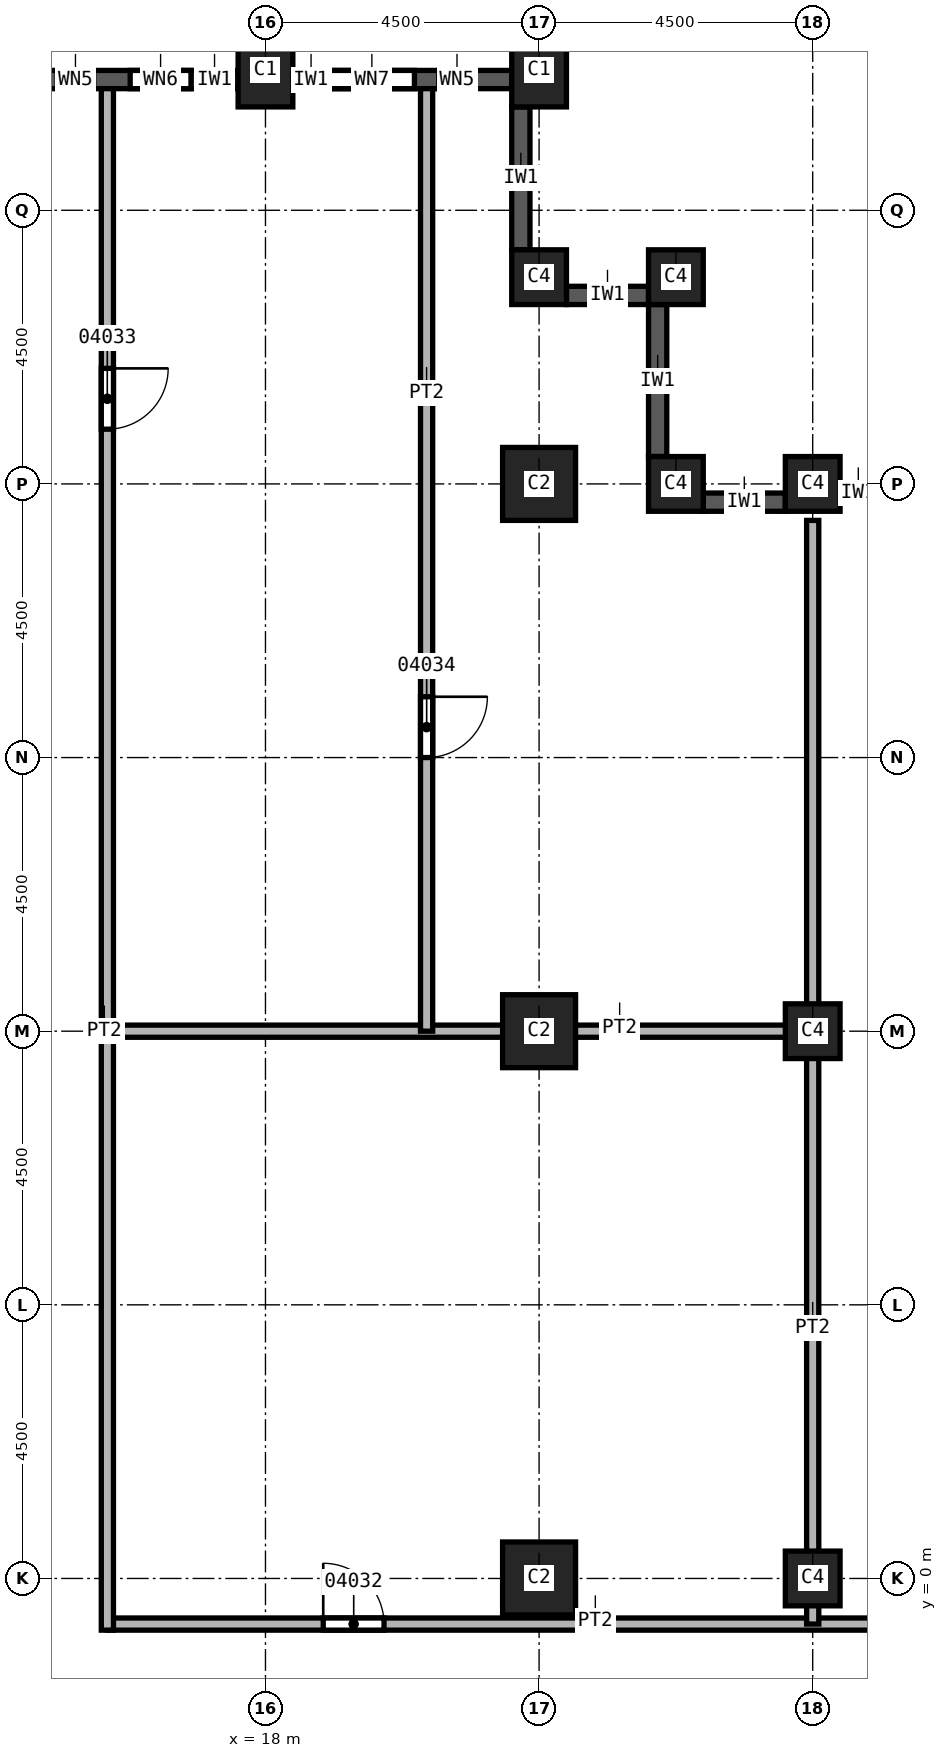
"""IFC4 building model, lengths in metres.
Left out: names, types, materials, properties, quantities, classifications, styles, units other than length and angle.
Written with IfcOpenShell. Run it as: python <this file> out.ifc"""

import sys

from ifc_helpers import new_model, si_unit, direction, frame, frame_2d, origin, origin_2d, place, context, subcontext, project, spatial, rectangle, extrude, element, fill, save


model = new_model("IFC4")
c1 = context("Model", 3, precision=1e-05, world=origin(), true_north=direction((0.0, 1.0)))
c2 = subcontext(c1, "Body", "Model", "MODEL_VIEW")
j1 = project(units=[si_unit("LENGTHUNIT", "METRE"), si_unit("PLANEANGLEUNIT", "RADIAN")], contexts=[c1])
p1 = place(None, origin())
s1 = spatial("IfcSite", under=j1, at=p1, CompositionType="ELEMENT")
p2 = place(p1, origin())
s2 = spatial("IfcBuilding", under=s1, at=p2, CompositionType="ELEMENT")
p3 = place(p2, frame((0.0, 0.0, 108.0)))
s3 = spatial("IfcBuildingStorey", under=s2, at=p3, CompositionType="ELEMENT", Elevation=108.0)
for number, where, z_axis, x_axis in (
    (1, (22.5, 0.0, 0.0), (0.0, 0.0, 1.0), (1.0, 0.0, 0.0)),
    (2, (22.5, 9.0, 0.0), (0.0, 0.0, 1.0), (1.0, 0.0, 0.0)),
    (3, (22.5, 18.0, 0.0), (0.0, 0.0, 1.0), (1.0, 0.0, 0.0)),
):
    element("IfcColumn", number, at=place(p3, frame(where, z_axis=z_axis, x_axis=x_axis)), inside=s3, PredefinedType="COLUMN", context=c2, shape_type="SweptSolid", body=[
        extrude(rectangle(XDim=1.2, YDim=1.2, at=origin_2d()), origin(), (0.0, 0.0, 1.0), 3.7),
    ])
for number, where, z_axis, x_axis in (
    (4, (27.0, 0.0, 0.0), (0.0, 0.0, 1.0), (1.0, 0.0, 0.0)),
    (5, (27.0, 9.0, 0.0), (0.0, 0.0, 1.0), (1.0, 0.0, 0.0)),
    (6, (27.0, 18.0, 0.0), (0.0, 0.0, 1.0), (1.0, 0.0, 0.0)),
):
    element("IfcColumn", number, at=place(p3, frame(where, z_axis=z_axis, x_axis=x_axis)), inside=s3, PredefinedType="COLUMN", context=c2, shape_type="SweptSolid", body=[
        extrude(rectangle(XDim=0.9, YDim=0.9, at=origin_2d()), origin(), (0.0, 0.0, 1.0), 3.7),
    ])
for number, where, z_axis, x_axis in (
    (7, (18.0, 24.8, 0.0), (0.0, 0.0, 1.0), (1.0, 0.0, 0.0)),
    (8, (22.5, 24.8, 0.0), (0.0, 0.0, 1.0), (1.0, 0.0, 0.0)),
):
    element("IfcColumn", number, at=place(p3, frame(where, z_axis=z_axis, x_axis=x_axis)), inside=s3, PredefinedType="COLUMN", context=c2, shape_type="SweptSolid", body=[
        extrude(rectangle(XDim=0.9, YDim=1.2, at=origin_2d()), origin(), (0.0, 0.0, 1.0), 3.7),
    ])
for number, where, z_axis, x_axis in (
    (9, (22.5, 21.4, 0.0), (0.0, 0.0, 1.0), (1.0, 0.0, 0.0)),
    (10, (24.75, 21.4, 0.0), (0.0, 0.0, 1.0), (1.0, 0.0, 0.0)),
    (11, (24.75, 18.0, 0.0), (0.0, 0.0, 1.0), (1.0, 0.0, 0.0)),
):
    element("IfcColumn", number, at=place(p3, frame(where, z_axis=z_axis, x_axis=x_axis)), inside=s3, PredefinedType="COLUMN", context=c2, shape_type="SweptSolid", body=[
        extrude(rectangle(XDim=0.9, YDim=0.9, at=origin_2d()), origin(), (0.0, 0.0, 1.0), 3.7),
    ])
p4 = place(p3, frame((31.05, 17.85, 0.0), z_axis=(0.0, 0.0, 1.0), x_axis=(-1.0, 0.0, 0.0)))
e12 = element("IfcWall", 12, at=p4, inside=s3, PredefinedType="SOLIDWALL", context=c2, shape_type="SweptSolid", body=[
    extrude(rectangle(XDim=3.6, YDim=0.3, at=frame_2d((1.8, 0.0))), origin(), (0.0, 0.0, 1.0), 3.1),
])
p5 = place(p4, frame((0.6, 0.0, 0.8)))
e13 = element("IfcOpeningElement", 13, at=p5, cuts=e12, PredefinedType="OPENING", context=c2, shape_type="SweptSolid", body=[
    extrude(rectangle(XDim=1.0, YDim=1.95, at=frame_2d((0.5, 0.975))), frame((0.0, 0.15, 0.0), z_axis=(0.0, -1.0, 0.0), x_axis=(1.0, 0.0, 0.0)), (0.0, 0.0, 1.0), 0.3),
])
p6 = place(p4, frame((2.0, 0.0, 0.8)))
e14 = element("IfcOpeningElement", 14, at=p6, cuts=e12, PredefinedType="OPENING", context=c2, shape_type="SweptSolid", body=[
    extrude(rectangle(XDim=1.0, YDim=1.95, at=frame_2d((0.5, 0.975))), frame((0.0, 0.15, 0.0), z_axis=(0.0, -1.0, 0.0), x_axis=(1.0, 0.0, 0.0)), (0.0, 0.0, 1.0), 0.3),
])
p7 = place(p3, frame((26.55, 17.7, 0.0), z_axis=(0.0, 0.0, 1.0), x_axis=(-1.0, 0.0, 0.0)))
e15 = element("IfcWall", 15, at=p7, inside=s3, PredefinedType="SOLIDWALL", context=c2, shape_type="SweptSolid", body=[
    extrude(rectangle(XDim=1.35, YDim=0.3, at=frame_2d((0.675, 0.0))), origin(), (0.0, 0.0, 1.0), 3.1),
])
p8 = place(p3, frame((24.45, 18.45, 0.0), z_axis=(0.0, 0.0, 1.0), x_axis=(0.0, 1.0, 0.0)))
e16 = element("IfcWall", 16, at=p8, inside=s3, PredefinedType="SOLIDWALL", context=c2, shape_type="SweptSolid", body=[
    extrude(rectangle(XDim=2.5, YDim=0.3, at=frame_2d((1.25, 0.0))), origin(), (0.0, 0.0, 1.0), 3.1),
])
p9 = place(p3, frame((24.3, 21.1, 0.0), z_axis=(0.0, 0.0, 1.0), x_axis=(-1.0, 0.0, 0.0)))
e17 = element("IfcWall", 17, at=p9, inside=s3, PredefinedType="SOLIDWALL", context=c2, shape_type="SweptSolid", body=[
    extrude(rectangle(XDim=1.35, YDim=0.3, at=frame_2d((0.675, 0.0))), origin(), (0.0, 0.0, 1.0), 3.1),
])
p10 = place(p3, frame((22.2, 21.85, 0.0), z_axis=(0.0, 0.0, 1.0), x_axis=(0.0, 1.0, 0.0)))
e18 = element("IfcWall", 18, at=p10, inside=s3, PredefinedType="SOLIDWALL", context=c2, shape_type="SweptSolid", body=[
    extrude(rectangle(XDim=2.35, YDim=0.3, at=frame_2d((1.175, 0.0))), origin(), (0.0, 0.0, 1.0), 3.1),
])
p11 = place(p3, frame((22.05, 24.65, 0.0), z_axis=(0.0, 0.0, 1.0), x_axis=(-1.0, 0.0, 0.0)))
e19 = element("IfcWall", 19, at=p11, inside=s3, PredefinedType="SOLIDWALL", context=c2, shape_type="SweptSolid", body=[
    extrude(rectangle(XDim=3.6, YDim=0.3, at=frame_2d((1.8, 0.0))), origin(), (0.0, 0.0, 1.0), 3.1),
])
p12 = place(p11, frame((0.6, 0.0, 0.8)))
e20 = element("IfcOpeningElement", 20, at=p12, cuts=e19, PredefinedType="OPENING", context=c2, shape_type="SweptSolid", body=[
    extrude(rectangle(XDim=0.6, YDim=1.95, at=frame_2d((0.3, 0.975))), frame((0.0, 0.15, 0.0), z_axis=(0.0, -1.0, 0.0), x_axis=(1.0, 0.0, 0.0)), (0.0, 0.0, 1.0), 0.3),
])
p13 = place(p11, frame((1.6, 0.0, 0.8)))
e21 = element("IfcOpeningElement", 21, at=p13, cuts=e19, PredefinedType="OPENING", context=c2, shape_type="SweptSolid", body=[
    extrude(rectangle(XDim=1.4, YDim=1.95, at=frame_2d((0.7, 0.975))), frame((0.0, 0.15, 0.0), z_axis=(0.0, -1.0, 0.0), x_axis=(1.0, 0.0, 0.0)), (0.0, 0.0, 1.0), 0.3),
])
p14 = place(p3, frame((17.55, 24.65, 0.0), z_axis=(0.0, 0.0, 1.0), x_axis=(-1.0, 0.0, 0.0)))
e22 = element("IfcWall", 22, at=p14, inside=s3, PredefinedType="SOLIDWALL", context=c2, shape_type="SweptSolid", body=[
    extrude(rectangle(XDim=3.6, YDim=0.3, at=frame_2d((1.8, 0.0))), origin(), (0.0, 0.0, 1.0), 3.1),
])
p15 = place(p14, frame((0.775, 0.0, 0.8)))
e23 = element("IfcOpeningElement", 23, at=p15, cuts=e22, PredefinedType="OPENING", context=c2, shape_type="SweptSolid", body=[
    extrude(rectangle(XDim=1.0, YDim=1.95, at=frame_2d((0.5, 0.975))), frame((0.0, 0.15, 0.0), z_axis=(0.0, -1.0, 0.0), x_axis=(1.0, 0.0, 0.0)), (0.0, 0.0, 1.0), 0.3),
])
p16 = place(p14, frame((2.375, 0.0, 0.8)))
e24 = element("IfcOpeningElement", 24, at=p16, cuts=e22, PredefinedType="OPENING", context=c2, shape_type="SweptSolid", body=[
    extrude(rectangle(XDim=0.6, YDim=1.95, at=frame_2d((0.3, 0.975))), frame((0.0, 0.15, 0.0), z_axis=(0.0, -1.0, 0.0), x_axis=(1.0, 0.0, 0.0)), (0.0, 0.0, 1.0), 0.3),
])
p17 = place(p3, frame((15.4, -0.75, 0.0), z_axis=(0.0, 0.0, 1.0), x_axis=(1.0, 0.0, 0.0)))
e25 = element("IfcWall", 25, at=p17, inside=s3, PredefinedType="PARTITIONING", context=c2, shape_type="SweptSolid", body=[
    extrude(rectangle(XDim=18.45, YDim=0.2, at=frame_2d((9.225, 0.0))), origin(), (0.0, 0.0, 1.0), 3.7),
])
p18 = place(p17, frame((3.55, 0.0, 0.0)))
e26 = element("IfcOpeningElement", 26, at=p18, cuts=e25, PredefinedType="OPENING", context=c2, shape_type="SweptSolid", body=[
    extrude(rectangle(XDim=1.0, YDim=2.1, at=frame_2d((0.5, 1.05))), frame((0.0, 0.1, 0.0), z_axis=(0.0, -1.0, 0.0), x_axis=(1.0, 0.0, 0.0)), (0.0, 0.0, 1.0), 0.2),
])
p19 = place(p17, frame((12.65, 0.0, 0.0)))
e27 = element("IfcOpeningElement", 27, at=p19, cuts=e25, PredefinedType="OPENING", context=c2, shape_type="SweptSolid", body=[
    extrude(rectangle(XDim=1.0, YDim=2.1, at=frame_2d((0.5, 1.05))), frame((0.0, 0.1, 0.0), z_axis=(0.0, -1.0, 0.0), x_axis=(1.0, 0.0, 0.0)), (0.0, 0.0, 1.0), 0.2),
])
p20 = place(p3, frame((15.4, 9.0, 0.0), z_axis=(0.0, 0.0, 1.0), x_axis=(1.0, 0.0, 0.0)))
e28 = element("IfcWall", 28, at=p20, inside=s3, PredefinedType="PARTITIONING", context=c2, shape_type="SweptSolid", body=[
    extrude(rectangle(XDim=11.7, YDim=0.2, at=frame_2d((5.85, 0.0))), origin(), (0.0, 0.0, 1.0), 3.7),
])
p21 = place(p3, frame((15.4, 24.5, 0.0), z_axis=(0.0, 0.0, 1.0), x_axis=(0.0, -1.0, 0.0)))
e29 = element("IfcWall", 29, at=p21, inside=s3, PredefinedType="PARTITIONING", context=c2, shape_type="SweptSolid", body=[
    extrude(rectangle(XDim=25.35, YDim=0.2, at=frame_2d((12.675, 0.0))), origin(), (0.0, 0.0, 1.0), 3.7),
])
p22 = place(p21, frame((4.6, 0.0, 0.0)))
e30 = element("IfcOpeningElement", 30, at=p22, cuts=e29, PredefinedType="OPENING", context=c2, shape_type="SweptSolid", body=[
    extrude(rectangle(XDim=1.0, YDim=2.1, at=frame_2d((0.5, 1.05))), frame((0.0, 0.1, 0.0), z_axis=(0.0, -1.0, 0.0), x_axis=(1.0, 0.0, 0.0)), (0.0, 0.0, 1.0), 0.2),
])
p23 = place(p3, frame((20.65, 24.5, 0.0), z_axis=(0.0, 0.0, 1.0), x_axis=(0.0, -1.0, 0.0)))
e31 = element("IfcWall", 31, at=p23, inside=s3, PredefinedType="PARTITIONING", context=c2, shape_type="SweptSolid", body=[
    extrude(rectangle(XDim=15.5, YDim=0.2, at=frame_2d((7.75, 0.0))), origin(), (0.0, 0.0, 1.0), 3.7),
])
p24 = place(p23, frame((10.0, 0.0, 0.0)))
e32 = element("IfcOpeningElement", 32, at=p24, cuts=e31, PredefinedType="OPENING", context=c2, shape_type="SweptSolid", body=[
    extrude(rectangle(XDim=1.0, YDim=2.1, at=frame_2d((0.5, 1.05))), frame((0.0, 0.1, 0.0), z_axis=(0.0, -1.0, 0.0), x_axis=(1.0, 0.0, 0.0)), (0.0, 0.0, 1.0), 0.2),
])
p25 = place(p3, frame((27.0, 17.4, 0.0), z_axis=(0.0, 0.0, 1.0), x_axis=(0.0, -1.0, 0.0)))
e33 = element("IfcWall", 33, at=p25, inside=s3, PredefinedType="PARTITIONING", context=c2, shape_type="SweptSolid", body=[
    extrude(rectangle(XDim=18.15, YDim=0.2, at=frame_2d((9.075, 0.0))), origin(), (0.0, 0.0, 1.0), 3.7),
])
p26 = place(p18, origin())
e34 = element("IfcDoor", 34, at=p26, inside=s3, OperationType="SINGLE_SWING_LEFT", PredefinedType="DOOR", context=c2, shape_type="SweptSolid", body=[
    extrude(rectangle(XDim=1.0, YDim=2.1, at=frame_2d((0.5, 1.05))), frame((0.0, 0.025, 0.0), z_axis=(0.0, -1.0, 0.0), x_axis=(1.0, 0.0, 0.0)), (0.0, 0.0, 1.0), 0.05),
])
fill(e26, e34)
p27 = place(p22, origin())
e35 = element("IfcDoor", 35, at=p27, inside=s3, OperationType="SINGLE_SWING_RIGHT", PredefinedType="DOOR", context=c2, shape_type="SweptSolid", body=[
    extrude(rectangle(XDim=1.0, YDim=2.1, at=frame_2d((0.5, 1.05))), frame((0.0, 0.025, 0.0), z_axis=(0.0, -1.0, 0.0), x_axis=(1.0, 0.0, 0.0)), (0.0, 0.0, 1.0), 0.05),
])
fill(e30, e35)
p28 = place(p24, origin())
e36 = element("IfcDoor", 36, at=p28, inside=s3, OperationType="SINGLE_SWING_LEFT", PredefinedType="DOOR", context=c2, shape_type="SweptSolid", body=[
    extrude(rectangle(XDim=1.0, YDim=2.1, at=frame_2d((0.5, 1.05))), frame((0.0, 0.025, 0.0), z_axis=(0.0, -1.0, 0.0), x_axis=(1.0, 0.0, 0.0)), (0.0, 0.0, 1.0), 0.05),
])
fill(e32, e36)
p29 = place(p12, origin())
e37 = element("IfcWindow", 37, at=p29, inside=s3, PartitioningType="SINGLE_PANEL", PredefinedType="WINDOW", context=c2, shape_type="SweptSolid", body=[
    extrude(rectangle(XDim=0.6, YDim=1.95, at=frame_2d((0.3, 0.975))), frame((0.0, 0.03, 0.0), z_axis=(0.0, -1.0, 0.0), x_axis=(1.0, 0.0, 0.0)), (0.0, 0.0, 1.0), 0.06),
])
fill(e20, e37)
p30 = place(p13, origin())
e38 = element("IfcWindow", 38, at=p30, inside=s3, PartitioningType="SINGLE_PANEL", PredefinedType="WINDOW", context=c2, shape_type="SweptSolid", body=[
    extrude(rectangle(XDim=1.4, YDim=1.95, at=frame_2d((0.7, 0.975))), frame((0.0, 0.03, 0.0), z_axis=(0.0, -1.0, 0.0), x_axis=(1.0, 0.0, 0.0)), (0.0, 0.0, 1.0), 0.06),
])
fill(e21, e38)
p31 = place(p15, origin())
e39 = element("IfcWindow", 39, at=p31, inside=s3, PartitioningType="SINGLE_PANEL", PredefinedType="WINDOW", context=c2, shape_type="SweptSolid", body=[
    extrude(rectangle(XDim=1.0, YDim=1.95, at=frame_2d((0.5, 0.975))), frame((0.0, 0.03, 0.0), z_axis=(0.0, -1.0, 0.0), x_axis=(1.0, 0.0, 0.0)), (0.0, 0.0, 1.0), 0.06),
])
fill(e23, e39)
p32 = place(p16, origin())
e40 = element("IfcWindow", 40, at=p32, inside=s3, PartitioningType="SINGLE_PANEL", PredefinedType="WINDOW", context=c2, shape_type="SweptSolid", body=[
    extrude(rectangle(XDim=0.6, YDim=1.95, at=frame_2d((0.3, 0.975))), frame((0.0, 0.03, 0.0), z_axis=(0.0, -1.0, 0.0), x_axis=(1.0, 0.0, 0.0)), (0.0, 0.0, 1.0), 0.06),
])
fill(e24, e40)
save(model, sys.argv[1])
